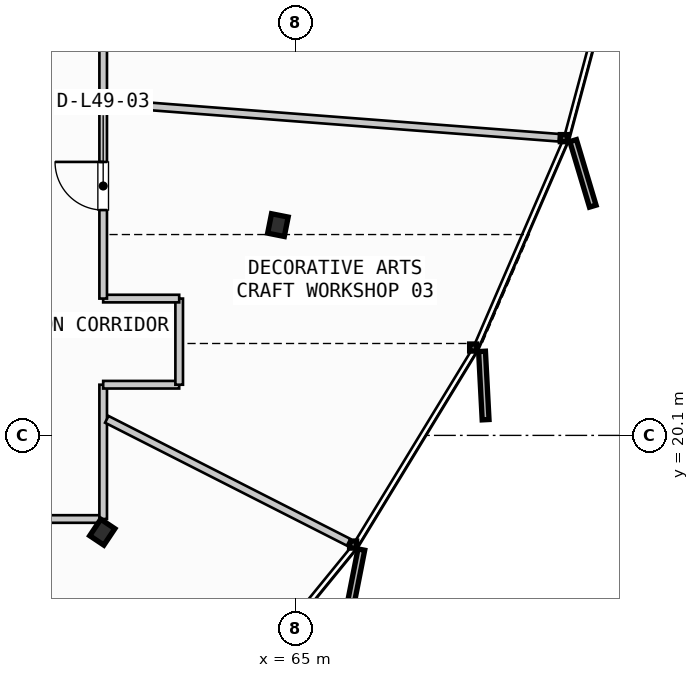
"""IFC4 building model, lengths in metres.
Left out: names, types, materials, properties, quantities, classifications, styles, units other than length and angle.
Written with IfcOpenShell. Run it as: python <this file> out.ifc"""

import sys

from ifc_helpers import new_model, si_unit, direction, frame, frame_2d, origin, origin_2d, place, context, subcontext, project, spatial, rectangle, i_section, extrude, source, transform, mapped, element, fill, save


model = new_model("IFC4")
c1 = context("Model", 3, precision=1e-05, world=origin(), true_north=direction((0.0, 1.0)))
c2 = subcontext(c1, "Body", "Model", "MODEL_VIEW")
j1 = project(units=[si_unit("LENGTHUNIT", "METRE"), si_unit("PLANEANGLEUNIT", "RADIAN")], contexts=[c1])
p1 = place(None, origin())
s1 = spatial("IfcSite", under=j1, at=p1, CompositionType="ELEMENT")
p2 = place(p1, origin())
s2 = spatial("IfcBuilding", under=s1, at=p2, CompositionType="ELEMENT")
p3 = place(p2, frame((0.0, 0.0, 190.4)))
s3 = spatial("IfcBuildingStorey", under=s2, at=p3, CompositionType="ELEMENT", Elevation=190.4)
m1 = source(origin(), c2, "Body", "SweptSolid", [
    extrude(i_section(OverallWidth=0.391, OverallDepth=0.335, WebThickness=0.023, FlangeThickness=0.034, FilletRadius=0.015, at=origin_2d()), origin(), (0.0, 0.0, 1.0), 3.26),
])
for number, where, z_axis, x_axis in (
    (1, (61.183, 18.19, 0.0), (0.0, 0.0, 1.0), (0.831, -0.556, 0.0)),
    (2, (64.649, 24.25, 0.0), (0.0, 0.0, 1.0), (0.981, -0.195, 0.0)),
):
    element("IfcColumn", number, at=place(p3, frame(where, z_axis=z_axis, x_axis=x_axis)), inside=s3, PredefinedType="COLUMN", context=c2, shape_type="MappedRepresentation", body=[
        mapped(m1, transform((0.0, 0.0, 0.0), scale=1.0)),
    ])
p4 = place(p3, frame((32.85, 18.45, 0.0), z_axis=(0.0, 0.0, 1.0), x_axis=(1.0, 0.0, 0.0)))
e3 = element("IfcWall", 3, at=p4, inside=s3, PredefinedType="PARTITIONING", context=c2, shape_type="SweptSolid", body=[
    extrude(rectangle(XDim=28.35, YDim=0.15, at=frame_2d((14.175, 0.0))), origin(), (0.0, 0.0, 1.0), 2.735),
])
p5 = place(p4, frame((5.381, 0.0, 0.0)))
e4 = element("IfcOpeningElement", 4, at=p5, cuts=e3, PredefinedType="OPENING", context=c2, shape_type="SweptSolid", body=[
    extrude(rectangle(XDim=0.95, YDim=2.15, at=frame_2d((0.475, 1.075))), frame((0.0, 0.085, 0.0), z_axis=(0.0, -1.0, 0.0), x_axis=(1.0, 0.0, 0.0)), (0.0, 0.0, 1.0), 0.17),
])
p6 = place(p4, frame((18.969, 0.0, 0.0)))
e5 = element("IfcOpeningElement", 5, at=p6, cuts=e3, PredefinedType="OPENING", context=c2, shape_type="SweptSolid", body=[
    extrude(rectangle(XDim=0.95, YDim=2.15, at=frame_2d((0.475, 1.075))), frame((0.0, 0.085, 0.0), z_axis=(0.0, -1.0, 0.0), x_axis=(1.0, 0.0, 0.0)), (0.0, 0.0, 1.0), 0.17),
])
p7 = place(p3, frame((61.2, 18.45, 0.0), z_axis=(0.0, 0.0, 1.0), x_axis=(0.0, 1.0, 0.0)))
e6 = element("IfcWall", 6, at=p7, inside=s3, PredefinedType="PARTITIONING", context=c2, shape_type="SweptSolid", body=[
    extrude(rectangle(XDim=2.65, YDim=0.15, at=frame_2d((1.325, 0.0))), origin(), (0.0, 0.0, 1.0), 2.735),
])
p8 = place(p3, frame((61.2, 21.1, 0.0), z_axis=(0.0, 0.0, 1.0), x_axis=(1.0, 0.0, 0.0)))
e7 = element("IfcWall", 7, at=p8, inside=s3, PredefinedType="PARTITIONING", context=c2, shape_type="SweptSolid", body=[
    extrude(rectangle(XDim=1.5, YDim=0.15, at=frame_2d((0.75, 0.0))), origin(), (0.0, 0.0, 1.0), 2.735),
])
p9 = place(p3, frame((62.7, 21.1, 0.0), z_axis=(0.0, 0.0, 1.0), x_axis=(0.0, 1.0, 0.0)))
e8 = element("IfcWall", 8, at=p9, inside=s3, PredefinedType="PARTITIONING", context=c2, shape_type="SweptSolid", body=[
    extrude(rectangle(XDim=1.7, YDim=0.15, at=frame_2d((0.85, 0.0))), origin(), (0.0, 0.0, 1.0), 2.735),
])
p10 = place(p3, frame((62.7, 22.8, 0.0), z_axis=(0.0, 0.0, 1.0), x_axis=(-1.0, 0.0, 0.0)))
e9 = element("IfcWall", 9, at=p10, inside=s3, PredefinedType="PARTITIONING", context=c2, shape_type="SweptSolid", body=[
    extrude(rectangle(XDim=1.5, YDim=0.15, at=frame_2d((0.75, 0.0))), origin(), (0.0, 0.0, 1.0), 2.735),
])
p11 = place(p3, frame((61.2, 22.8, 0.0), z_axis=(0.0, 0.0, 1.0), x_axis=(0.0, 1.0, 0.0)))
e10 = element("IfcWall", 10, at=p11, inside=s3, PredefinedType="PARTITIONING", context=c2, shape_type="SweptSolid", body=[
    extrude(rectangle(XDim=10.0, YDim=0.15, at=frame_2d((5.0, 0.0))), origin(), (0.0, 0.0, 1.0), 2.735),
])
p12 = place(p11, frame((1.747, 0.0, 0.0)))
e11 = element("IfcOpeningElement", 11, at=p12, cuts=e10, PredefinedType="OPENING", context=c2, shape_type="SweptSolid", body=[
    extrude(rectangle(XDim=0.95, YDim=2.15, at=frame_2d((0.475, 1.075))), frame((0.0, 0.085, 0.0), z_axis=(0.0, -1.0, 0.0), x_axis=(1.0, 0.0, 0.0)), (0.0, 0.0, 1.0), 0.17),
])
p13 = place(p11, frame((6.167, 0.0, 0.0)))
e12 = element("IfcOpeningElement", 12, at=p13, cuts=e10, PredefinedType="OPENING", context=c2, shape_type="SweptSolid", body=[
    extrude(rectangle(XDim=0.95, YDim=2.15, at=frame_2d((0.475, 1.075))), frame((0.0, 0.085, 0.0), z_axis=(0.0, -1.0, 0.0), x_axis=(1.0, 0.0, 0.0)), (0.0, 0.0, 1.0), 0.17),
])
p14 = place(p3, frame((61.271, 20.417, 0.0), z_axis=(0.0, 0.0, 1.0), x_axis=(0.891443209294, -0.453132436054, 0.0)))
e13 = element("IfcWall", 13, at=p14, inside=s3, PredefinedType="PARTITIONING", context=c2, shape_type="SweptSolid", body=[
    extrude(rectangle(XDim=5.353, YDim=0.15, at=frame_2d((2.677, 0.0))), origin(), (0.0, 0.0, 1.0), 2.735),
])
p15 = place(p3, frame((61.28, 26.658, 0.0), z_axis=(0.0, 0.0, 1.0), x_axis=(0.997071171595, -0.07647927023, 0.0)))
e14 = element("IfcWall", 14, at=p15, inside=s3, PredefinedType="PARTITIONING", context=c2, shape_type="SweptSolid", body=[
    extrude(rectangle(XDim=8.938, YDim=0.15, at=frame_2d((4.469, 0.0))), origin(), (0.0, 0.0, 1.0), 2.735),
])
m2 = source(origin(), c2, "Body", "SweptSolid", [
    extrude(rectangle(XDim=0.95, YDim=2.15, at=frame_2d((0.475, 1.075))), frame((0.0, 0.025, 0.0), z_axis=(0.0, -1.0, 0.0), x_axis=(1.0, 0.0, 0.0)), (0.0, 0.0, 1.0), 0.05),
])
p16 = place(p12, origin())
e15 = element("IfcDoor", 15, at=p16, inside=s3, OperationType="SINGLE_SWING_RIGHT", PredefinedType="DOOR", context=c2, shape_type="MappedRepresentation", body=[
    mapped(m2, transform((0.0, 0.0, 0.0), scale=1.0)),
])
fill(e11, e15)
save(model, sys.argv[1])
